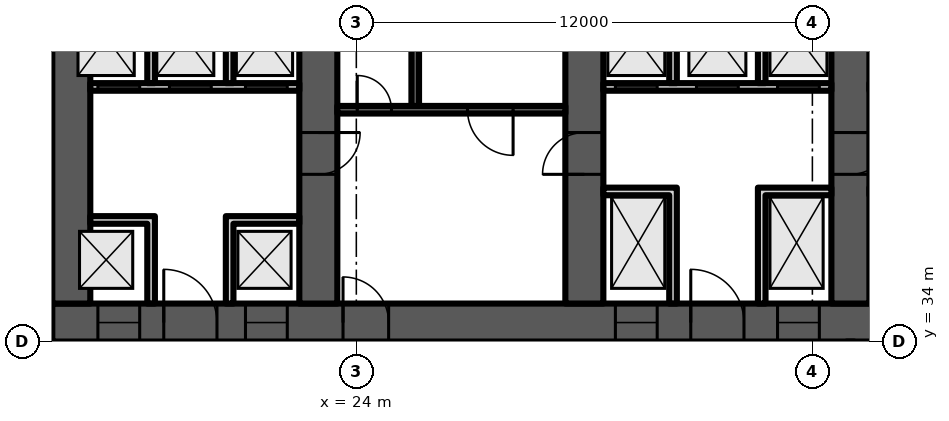
"""IFC4 building model, lengths in metres.
Left out: names, types, materials, properties, quantities, classifications, styles, units other than length and angle.
Written with IfcOpenShell. Run it as: python <this file> out.ifc"""

import sys

from ifc_helpers import new_model, si_unit, direction, frame, frame_2d, origin, place, context, subcontext, project, spatial, polyline, rectangle, outline, extrude, element, fill, save


model = new_model("IFC4")
c1 = context("Model", 3, precision=1e-05, world=origin(), true_north=direction((0.0, 1.0)))
c2 = subcontext(c1, "Body", "Model", "MODEL_VIEW")
j1 = project(units=[si_unit("LENGTHUNIT", "METRE"), si_unit("PLANEANGLEUNIT", "RADIAN")], contexts=[c1])
p1 = place(None, origin())
s1 = spatial("IfcSite", under=j1, at=p1, CompositionType="ELEMENT")
p2 = place(p1, origin())
s2 = spatial("IfcBuilding", under=s1, at=p2, CompositionType="ELEMENT")
p3 = place(p2, frame((0.0, 0.0, 147.1)))
s3 = spatial("IfcBuildingStorey", under=s2, at=p3, CompositionType="ELEMENT", Elevation=147.1)
p4 = place(p3, frame((16.0, 34.5, 0.0), z_axis=(0.0, 0.0, 1.0), x_axis=(1.0, 0.0, 0.0)))
e1 = element("IfcWall", 1, at=p4, inside=s3, PredefinedType="SHEAR", context=c2, shape_type="SweptSolid", body=[
    extrude(rectangle(XDim=49.0, YDim=1.0, at=frame_2d((24.5, 0.0))), origin(), (0.0, 0.0, 1.0), 4.8),
])
p5 = place(p4, frame((1.2, 0.0, 0.0)))
e2 = element("IfcOpeningElement", 2, at=p5, cuts=e1, PredefinedType="OPENING", context=c2, shape_type="SweptSolid", body=[
    extrude(rectangle(XDim=1.1, YDim=2.1, at=frame_2d((0.55, 1.05))), frame((0.0, 0.51, 0.0), z_axis=(0.0, -1.0, 0.0), x_axis=(1.0, 0.0, 0.0)), (0.0, 0.0, 1.0), 1.02),
])
p6 = place(p4, frame((5.083, 0.0, 0.0)))
e3 = element("IfcOpeningElement", 3, at=p6, cuts=e1, PredefinedType="OPENING", context=c2, shape_type="SweptSolid", body=[
    extrude(rectangle(XDim=1.1, YDim=2.1, at=frame_2d((0.55, 1.05))), frame((0.0, 0.51, 0.0), z_axis=(0.0, -1.0, 0.0), x_axis=(1.0, 0.0, 0.0)), (0.0, 0.0, 1.0), 1.02),
])
p7 = place(p4, frame((2.933, 0.0, 0.0)))
e4 = element("IfcOpeningElement", 4, at=p7, cuts=e1, PredefinedType="OPENING", context=c2, shape_type="SweptSolid", body=[
    extrude(rectangle(XDim=1.4, YDim=2.1, at=frame_2d((0.7, 1.05))), frame((0.0, 0.51, 0.0), z_axis=(0.0, -1.0, 0.0), x_axis=(1.0, 0.0, 0.0)), (0.0, 0.0, 1.0), 1.02),
])
p8 = place(p4, frame((7.65, 0.0, 0.0)))
e5 = element("IfcOpeningElement", 5, at=p8, cuts=e1, PredefinedType="OPENING", context=c2, shape_type="SweptSolid", body=[
    extrude(rectangle(XDim=1.2, YDim=2.1, at=frame_2d((0.6, 1.05))), frame((0.0, 0.51, 0.0), z_axis=(0.0, -1.0, 0.0), x_axis=(1.0, 0.0, 0.0)), (0.0, 0.0, 1.0), 1.02),
])
p9 = place(p4, frame((14.817, 0.0, 0.0)))
e6 = element("IfcOpeningElement", 6, at=p9, cuts=e1, PredefinedType="OPENING", context=c2, shape_type="SweptSolid", body=[
    extrude(rectangle(XDim=1.1, YDim=2.1, at=frame_2d((0.55, 1.05))), frame((0.0, 0.51, 0.0), z_axis=(0.0, -1.0, 0.0), x_axis=(1.0, 0.0, 0.0)), (0.0, 0.0, 1.0), 1.02),
])
p10 = place(p4, frame((19.083, 0.0, 0.0)))
e7 = element("IfcOpeningElement", 7, at=p10, cuts=e1, PredefinedType="OPENING", context=c2, shape_type="SweptSolid", body=[
    extrude(rectangle(XDim=1.1, YDim=2.1, at=frame_2d((0.55, 1.05))), frame((0.0, 0.51, 0.0), z_axis=(0.0, -1.0, 0.0), x_axis=(1.0, 0.0, 0.0)), (0.0, 0.0, 1.0), 1.02),
])
p11 = place(p4, frame((16.8, 0.0, 0.0)))
e8 = element("IfcOpeningElement", 8, at=p11, cuts=e1, PredefinedType="OPENING", context=c2, shape_type="SweptSolid", body=[
    extrude(rectangle(XDim=1.4, YDim=2.1, at=frame_2d((0.7, 1.05))), frame((0.0, 0.51, 0.0), z_axis=(0.0, -1.0, 0.0), x_axis=(1.0, 0.0, 0.0)), (0.0, 0.0, 1.0), 1.02),
])
p12 = place(p4, frame((21.817, 0.0, 0.0)))
e9 = element("IfcOpeningElement", 9, at=p12, cuts=e1, PredefinedType="OPENING", context=c2, shape_type="SweptSolid", body=[
    extrude(rectangle(XDim=1.1, YDim=2.1, at=frame_2d((0.55, 1.05))), frame((0.0, 0.51, 0.0), z_axis=(0.0, -1.0, 0.0), x_axis=(1.0, 0.0, 0.0)), (0.0, 0.0, 1.0), 1.02),
])
p13 = place(p4, frame((23.95, 0.0, 0.0)))
e10 = element("IfcOpeningElement", 10, at=p13, cuts=e1, PredefinedType="OPENING", context=c2, shape_type="SweptSolid", body=[
    extrude(rectangle(XDim=1.1, YDim=2.1, at=frame_2d((0.55, 1.05))), frame((0.0, 0.51, 0.0), z_axis=(0.0, -1.0, 0.0), x_axis=(1.0, 0.0, 0.0)), (0.0, 0.0, 1.0), 1.02),
])
p14 = place(p4, frame((26.083, 0.0, 0.0)))
e11 = element("IfcOpeningElement", 11, at=p14, cuts=e1, PredefinedType="OPENING", context=c2, shape_type="SweptSolid", body=[
    extrude(rectangle(XDim=1.1, YDim=2.1, at=frame_2d((0.55, 1.05))), frame((0.0, 0.51, 0.0), z_axis=(0.0, -1.0, 0.0), x_axis=(1.0, 0.0, 0.0)), (0.0, 0.0, 1.0), 1.02),
])
p15 = place(p4, frame((33.15, 0.0, 0.0)))
e12 = element("IfcOpeningElement", 12, at=p15, cuts=e1, PredefinedType="OPENING", context=c2, shape_type="SweptSolid", body=[
    extrude(rectangle(XDim=1.2, YDim=2.1, at=frame_2d((0.6, 1.05))), frame((0.0, 0.51, 0.0), z_axis=(0.0, -1.0, 0.0), x_axis=(1.0, 0.0, 0.0)), (0.0, 0.0, 1.0), 1.02),
])
p16 = place(p4, frame((35.817, 0.0, 0.0)))
e13 = element("IfcOpeningElement", 13, at=p16, cuts=e1, PredefinedType="OPENING", context=c2, shape_type="SweptSolid", body=[
    extrude(rectangle(XDim=1.1, YDim=2.1, at=frame_2d((0.55, 1.05))), frame((0.0, 0.51, 0.0), z_axis=(0.0, -1.0, 0.0), x_axis=(1.0, 0.0, 0.0)), (0.0, 0.0, 1.0), 1.02),
])
p17 = place(p4, frame((40.083, 0.0, 0.0)))
e14 = element("IfcOpeningElement", 14, at=p17, cuts=e1, PredefinedType="OPENING", context=c2, shape_type="SweptSolid", body=[
    extrude(rectangle(XDim=1.1, YDim=2.1, at=frame_2d((0.55, 1.05))), frame((0.0, 0.51, 0.0), z_axis=(0.0, -1.0, 0.0), x_axis=(1.0, 0.0, 0.0)), (0.0, 0.0, 1.0), 1.02),
])
p18 = place(p4, frame((37.8, 0.0, 0.0)))
e15 = element("IfcOpeningElement", 15, at=p18, cuts=e1, PredefinedType="OPENING", context=c2, shape_type="SweptSolid", body=[
    extrude(rectangle(XDim=1.4, YDim=2.1, at=frame_2d((0.7, 1.05))), frame((0.0, 0.51, 0.0), z_axis=(0.0, -1.0, 0.0), x_axis=(1.0, 0.0, 0.0)), (0.0, 0.0, 1.0), 1.02),
])
p19 = place(p4, frame((42.817, 0.0, 0.0)))
e16 = element("IfcOpeningElement", 16, at=p19, cuts=e1, PredefinedType="OPENING", context=c2, shape_type="SweptSolid", body=[
    extrude(rectangle(XDim=1.1, YDim=2.1, at=frame_2d((0.55, 1.05))), frame((0.0, 0.51, 0.0), z_axis=(0.0, -1.0, 0.0), x_axis=(1.0, 0.0, 0.0)), (0.0, 0.0, 1.0), 1.02),
])
p20 = place(p4, frame((46.7, 0.0, 0.0)))
e17 = element("IfcOpeningElement", 17, at=p20, cuts=e1, PredefinedType="OPENING", context=c2, shape_type="SweptSolid", body=[
    extrude(rectangle(XDim=1.1, YDim=2.1, at=frame_2d((0.55, 1.05))), frame((0.0, 0.51, 0.0), z_axis=(0.0, -1.0, 0.0), x_axis=(1.0, 0.0, 0.0)), (0.0, 0.0, 1.0), 1.02),
])
p21 = place(p4, frame((44.667, 0.0, 0.0)))
e18 = element("IfcOpeningElement", 18, at=p21, cuts=e1, PredefinedType="OPENING", context=c2, shape_type="SweptSolid", body=[
    extrude(rectangle(XDim=1.4, YDim=2.1, at=frame_2d((0.7, 1.05))), frame((0.0, 0.51, 0.0), z_axis=(0.0, -1.0, 0.0), x_axis=(1.0, 0.0, 0.0)), (0.0, 0.0, 1.0), 1.02),
])
p22 = place(p3, frame((16.5, 35.0, 0.0), z_axis=(0.0, 0.0, 1.0), x_axis=(0.0, 1.0, 0.0)))
e19 = element("IfcWall", 19, at=p22, inside=s3, PredefinedType="SHEAR", context=c2, shape_type="SweptSolid", body=[
    extrude(rectangle(XDim=12.784, YDim=1.0, at=frame_2d((6.392, 0.0))), origin(), (0.0, 0.0, 1.0), 4.8),
])
p23 = place(p3, frame((23.0, 35.0, 0.0), z_axis=(0.0, 0.0, 1.0), x_axis=(0.0, 1.0, 0.0)))
e20 = element("IfcWall", 20, at=p23, inside=s3, PredefinedType="SHEAR", context=c2, shape_type="SweptSolid", body=[
    extrude(rectangle(XDim=13.352, YDim=1.0, at=frame_2d((6.676, 0.0))), origin(), (0.0, 0.0, 1.0), 4.8),
])
p24 = place(p23, frame((10.426, 0.0, 0.0)))
e21 = element("IfcOpeningElement", 21, at=p24, cuts=e20, PredefinedType="OPENING", context=c2, shape_type="SweptSolid", body=[
    extrude(rectangle(XDim=1.0, YDim=2.1, at=frame_2d((0.5, 1.05))), frame((0.0, 0.51, 0.0), z_axis=(0.0, -1.0, 0.0), x_axis=(1.0, 0.0, 0.0)), (0.0, 0.0, 1.0), 1.02),
])
p25 = place(p23, frame((3.4, 0.0, 0.0)))
e22 = element("IfcOpeningElement", 22, at=p25, cuts=e20, PredefinedType="OPENING", context=c2, shape_type="SweptSolid", body=[
    extrude(rectangle(XDim=1.1, YDim=2.1, at=frame_2d((0.55, 1.05))), frame((0.0, 0.51, 0.0), z_axis=(0.0, -1.0, 0.0), x_axis=(1.0, 0.0, 0.0)), (0.0, 0.0, 1.0), 1.02),
])
p26 = place(p3, frame((30.0, 35.0, 0.0), z_axis=(0.0, 0.0, 1.0), x_axis=(0.0, 1.0, 0.0)))
e23 = element("IfcWall", 23, at=p26, inside=s3, PredefinedType="SHEAR", context=c2, shape_type="SweptSolid", body=[
    extrude(rectangle(XDim=13.965, YDim=1.0, at=frame_2d((6.982, 0.0))), origin(), (0.0, 0.0, 1.0), 4.8),
])
p27 = place(p26, frame((3.4, 0.0, 0.0)))
e24 = element("IfcOpeningElement", 24, at=p27, cuts=e23, PredefinedType="OPENING", context=c2, shape_type="SweptSolid", body=[
    extrude(rectangle(XDim=1.1, YDim=2.1, at=frame_2d((0.55, 1.05))), frame((0.0, 0.51, 0.0), z_axis=(0.0, -1.0, 0.0), x_axis=(1.0, 0.0, 0.0)), (0.0, 0.0, 1.0), 1.02),
])
p28 = place(p3, frame((37.0, 35.0, 0.0), z_axis=(0.0, 0.0, 1.0), x_axis=(0.0, 1.0, 0.0)))
e25 = element("IfcWall", 25, at=p28, inside=s3, PredefinedType="SHEAR", context=c2, shape_type="SweptSolid", body=[
    extrude(rectangle(XDim=14.577, YDim=1.0, at=frame_2d((7.289, 0.0))), origin(), (0.0, 0.0, 1.0), 4.8),
])
p29 = place(p28, frame((11.016, 0.0, 0.0)))
e26 = element("IfcOpeningElement", 26, at=p29, cuts=e25, PredefinedType="OPENING", context=c2, shape_type="SweptSolid", body=[
    extrude(rectangle(XDim=1.0, YDim=2.1, at=frame_2d((0.5, 1.05))), frame((0.0, 0.51, 0.0), z_axis=(0.0, -1.0, 0.0), x_axis=(1.0, 0.0, 0.0)), (0.0, 0.0, 1.0), 1.02),
])
p30 = place(p28, frame((3.4, 0.0, 0.0)))
e27 = element("IfcOpeningElement", 27, at=p30, cuts=e25, PredefinedType="OPENING", context=c2, shape_type="SweptSolid", body=[
    extrude(rectangle(XDim=1.1, YDim=2.1, at=frame_2d((0.55, 1.05))), frame((0.0, 0.51, 0.0), z_axis=(0.0, -1.0, 0.0), x_axis=(1.0, 0.0, 0.0)), (0.0, 0.0, 1.0), 1.02),
])
p31 = place(p3, frame((17.0, 40.7, 0.0), z_axis=(0.0, 0.0, 1.0), x_axis=(1.0, 0.0, 0.0)))
e28 = element("IfcWall", 28, at=p31, inside=s3, PredefinedType="PARTITIONING", context=c2, shape_type="SweptSolid", body=[
    extrude(rectangle(XDim=5.5, YDim=0.2, at=frame_2d((2.75, 0.0))), origin(), (0.0, 0.0, 1.0), 4.4),
])
p32 = place(p31, frame((0.2, 0.0, 0.0)))
e29 = element("IfcOpeningElement", 29, at=p32, cuts=e28, PredefinedType="OPENING", context=c2, shape_type="SweptSolid", body=[
    extrude(rectangle(XDim=1.1, YDim=2.1, at=frame_2d((0.55, 1.05))), frame((0.0, 0.11, 0.0), z_axis=(0.0, -1.0, 0.0), x_axis=(1.0, 0.0, 0.0)), (0.0, 0.0, 1.0), 0.22),
])
p33 = place(p31, frame((2.083, 0.0, 0.0)))
e30 = element("IfcOpeningElement", 30, at=p33, cuts=e28, PredefinedType="OPENING", context=c2, shape_type="SweptSolid", body=[
    extrude(rectangle(XDim=1.1, YDim=2.1, at=frame_2d((0.55, 1.05))), frame((0.0, 0.11, 0.0), z_axis=(0.0, -1.0, 0.0), x_axis=(1.0, 0.0, 0.0)), (0.0, 0.0, 1.0), 0.22),
])
p34 = place(p31, frame((4.083, 0.0, 0.0)))
e31 = element("IfcOpeningElement", 31, at=p34, cuts=e28, PredefinedType="OPENING", context=c2, shape_type="SweptSolid", body=[
    extrude(rectangle(XDim=1.1, YDim=2.1, at=frame_2d((0.55, 1.05))), frame((0.0, 0.11, 0.0), z_axis=(0.0, -1.0, 0.0), x_axis=(1.0, 0.0, 0.0)), (0.0, 0.0, 1.0), 0.22),
])
p35 = place(p3, frame((0.0, 0.0, -0.0)))
e32 = element("IfcWall", 32, at=p35, inside=s3, PredefinedType="PARTITIONING", context=c2, shape_type="SweptSolid", body=[
    extrude(outline(polyline([(18.5, 37.1), (17.0, 37.1), (17.0, 37.3), (18.5, 37.3), (18.7, 37.3), (18.7, 35.0), (18.5, 35.0), (18.5, 37.1)])), origin(), (0.0, 0.0, 1.0), 4.4),
])
p36 = place(p3, frame((0.0, 0.0, -0.0)))
e33 = element("IfcWall", 33, at=p36, inside=s3, PredefinedType="PARTITIONING", context=c2, shape_type="SweptSolid", body=[
    extrude(outline(polyline([(20.567, 37.3), (20.767, 37.3), (22.5, 37.3), (22.5, 37.1), (20.767, 37.1), (20.767, 35.0), (20.567, 35.0), (20.567, 37.3)])), origin(), (0.0, 0.0, 1.0), 4.4),
])
p37 = place(p3, frame((0.0, 0.0, -0.0)))
e34 = element("IfcWall", 34, at=p37, inside=s3, PredefinedType="PARTITIONING", context=c2, shape_type="SweptSolid", body=[
    extrude(outline(polyline([(18.7, 40.8), (18.5, 40.8), (18.5, 43.8), (17.0, 43.8), (17.0, 44.0), (22.5, 44.0), (22.5, 43.8), (20.767, 43.8), (20.767, 40.8), (20.567, 40.8), (20.567, 43.8), (18.7, 43.8), (18.7, 40.8)])), origin(), (0.0, 0.0, 1.0), 4.4),
])
p38 = place(p3, frame((23.5, 40.1, 0.0), z_axis=(0.0, 0.0, 1.0), x_axis=(1.0, 0.0, 0.0)))
e35 = element("IfcWall", 35, at=p38, inside=s3, PredefinedType="SHEAR", context=c2, shape_type="SweptSolid", body=[
    extrude(rectangle(XDim=6.0, YDim=0.2, at=frame_2d((3.0, 0.0))), origin(), (0.0, 0.0, 1.0), 4.4),
])
p39 = place(p38, frame((3.425, 0.0, 0.0)))
e36 = element("IfcOpeningElement", 36, at=p39, cuts=e35, PredefinedType="OPENING", context=c2, shape_type="SweptSolid", body=[
    extrude(rectangle(XDim=1.2, YDim=2.1, at=frame_2d((0.6, 1.05))), frame((0.0, 0.11, 0.0), z_axis=(0.0, -1.0, 0.0), x_axis=(1.0, 0.0, 0.0)), (0.0, 0.0, 1.0), 0.22),
])
p40 = place(p38, frame((0.525, 0.0, 0.0)))
e37 = element("IfcOpeningElement", 37, at=p40, cuts=e35, PredefinedType="OPENING", context=c2, shape_type="SweptSolid", body=[
    extrude(rectangle(XDim=0.9, YDim=2.1, at=frame_2d((0.45, 1.05))), frame((0.0, 0.11, 0.0), z_axis=(0.0, -1.0, 0.0), x_axis=(1.0, 0.0, 0.0)), (0.0, 0.0, 1.0), 0.22),
])
p41 = place(p3, frame((25.55, 40.2, 0.0), z_axis=(0.0, 0.0, 1.0), x_axis=(0.0, 1.0, 0.0)))
e38 = element("IfcWall", 38, at=p41, inside=s3, PredefinedType="SHEAR", context=c2, shape_type="SweptSolid", body=[
    extrude(rectangle(XDim=7.2, YDim=0.2, at=frame_2d((3.6, 0.0))), origin(), (0.0, 0.0, 1.0), 4.4),
])
p42 = place(p3, frame((30.5, 40.7, 0.0), z_axis=(0.0, 0.0, 1.0), x_axis=(1.0, 0.0, 0.0)))
e39 = element("IfcWall", 39, at=p42, inside=s3, PredefinedType="PARTITIONING", context=c2, shape_type="SweptSolid", body=[
    extrude(rectangle(XDim=6.0, YDim=0.2, at=frame_2d((3.0, 0.0))), origin(), (0.0, 0.0, 1.0), 4.4),
])
p43 = place(p42, frame((0.317, 0.0, 0.0)))
e40 = element("IfcOpeningElement", 40, at=p43, cuts=e39, PredefinedType="OPENING", context=c2, shape_type="SweptSolid", body=[
    extrude(rectangle(XDim=1.1, YDim=2.1, at=frame_2d((0.55, 1.05))), frame((0.0, 0.11, 0.0), z_axis=(0.0, -1.0, 0.0), x_axis=(1.0, 0.0, 0.0)), (0.0, 0.0, 1.0), 0.22),
])
p44 = place(p42, frame((2.45, 0.0, 0.0)))
e41 = element("IfcOpeningElement", 41, at=p44, cuts=e39, PredefinedType="OPENING", context=c2, shape_type="SweptSolid", body=[
    extrude(rectangle(XDim=1.1, YDim=2.1, at=frame_2d((0.55, 1.05))), frame((0.0, 0.11, 0.0), z_axis=(0.0, -1.0, 0.0), x_axis=(1.0, 0.0, 0.0)), (0.0, 0.0, 1.0), 0.22),
])
p45 = place(p42, frame((4.583, 0.0, 0.0)))
e42 = element("IfcOpeningElement", 42, at=p45, cuts=e39, PredefinedType="OPENING", context=c2, shape_type="SweptSolid", body=[
    extrude(rectangle(XDim=1.1, YDim=2.1, at=frame_2d((0.55, 1.05))), frame((0.0, 0.11, 0.0), z_axis=(0.0, -1.0, 0.0), x_axis=(1.0, 0.0, 0.0)), (0.0, 0.0, 1.0), 0.22),
])
p46 = place(p3, frame((0.0, 0.0, -0.0)))
e43 = element("IfcWall", 43, at=p46, inside=s3, PredefinedType="PARTITIONING", context=c2, shape_type="SweptSolid", body=[
    extrude(outline(polyline([(32.233, 37.85), (30.5, 37.85), (30.5, 38.05), (32.233, 38.05), (32.433, 38.05), (32.433, 35.0), (32.233, 35.0), (32.233, 37.85)])), origin(), (0.0, 0.0, 1.0), 4.4),
])
p47 = place(p3, frame((0.0, 0.0, -0.0)))
e44 = element("IfcWall", 44, at=p47, inside=s3, PredefinedType="PARTITIONING", context=c2, shape_type="SweptSolid", body=[
    extrude(outline(polyline([(34.567, 38.05), (34.767, 38.05), (36.5, 38.05), (36.5, 37.85), (34.767, 37.85), (34.767, 35.0), (34.567, 35.0), (34.567, 38.05)])), origin(), (0.0, 0.0, 1.0), 4.4),
])
p48 = place(p3, frame((0.0, 0.0, -0.0)))
e45 = element("IfcWall", 45, at=p48, inside=s3, PredefinedType="PARTITIONING", context=c2, shape_type="SweptSolid", body=[
    extrude(outline(polyline([(32.433, 40.8), (32.233, 40.8), (32.233, 43.8), (30.5, 43.8), (30.5, 44.0), (36.5, 44.0), (36.5, 43.8), (34.767, 43.8), (34.767, 40.8), (34.567, 40.8), (34.567, 43.8), (32.433, 43.8), (32.433, 40.8)])), origin(), (0.0, 0.0, 1.0), 4.4),
])
p49 = place(p5, origin())
e46 = element("IfcDoor", 46, at=p49, inside=s3, OperationType="DOUBLE_DOOR_SLIDING", PredefinedType="DOOR", context=c2, shape_type="SweptSolid", body=[
    extrude(rectangle(XDim=1.1, YDim=2.1, at=frame_2d((0.55, 1.05))), frame((0.0, 0.025, 0.0), z_axis=(0.0, -1.0, 0.0), x_axis=(1.0, 0.0, 0.0)), (0.0, 0.0, 1.0), 0.05),
])
fill(e2, e46)
p50 = place(p6, origin())
e47 = element("IfcDoor", 47, at=p50, inside=s3, OperationType="DOUBLE_DOOR_SLIDING", PredefinedType="DOOR", context=c2, shape_type="SweptSolid", body=[
    extrude(rectangle(XDim=1.1, YDim=2.1, at=frame_2d((0.55, 1.05))), frame((0.0, 0.025, 0.0), z_axis=(0.0, -1.0, 0.0), x_axis=(1.0, 0.0, 0.0)), (0.0, 0.0, 1.0), 0.05),
])
fill(e3, e47)
p51 = place(p7, origin())
e48 = element("IfcDoor", 48, at=p51, inside=s3, OperationType="DOUBLE_DOOR_SINGLE_SWING", PredefinedType="DOOR", context=c2, shape_type="SweptSolid", body=[
    extrude(rectangle(XDim=1.4, YDim=2.1, at=frame_2d((0.7, 1.05))), frame((0.0, 0.025, 0.0), z_axis=(0.0, -1.0, 0.0), x_axis=(1.0, 0.0, 0.0)), (0.0, 0.0, 1.0), 0.05),
])
fill(e4, e48)
p52 = place(p32, origin())
e49 = element("IfcDoor", 49, at=p52, inside=s3, OperationType="DOUBLE_DOOR_SLIDING", PredefinedType="DOOR", context=c2, shape_type="SweptSolid", body=[
    extrude(rectangle(XDim=1.1, YDim=2.1, at=frame_2d((0.55, 1.05))), frame((0.0, 0.025, 0.0), z_axis=(0.0, -1.0, 0.0), x_axis=(1.0, 0.0, 0.0)), (0.0, 0.0, 1.0), 0.05),
])
fill(e29, e49)
p53 = place(p33, origin())
e50 = element("IfcDoor", 50, at=p53, inside=s3, OperationType="DOUBLE_DOOR_SLIDING", PredefinedType="DOOR", context=c2, shape_type="SweptSolid", body=[
    extrude(rectangle(XDim=1.1, YDim=2.1, at=frame_2d((0.55, 1.05))), frame((0.0, 0.025, 0.0), z_axis=(0.0, -1.0, 0.0), x_axis=(1.0, 0.0, 0.0)), (0.0, 0.0, 1.0), 0.05),
])
fill(e30, e50)
p54 = place(p34, origin())
e51 = element("IfcDoor", 51, at=p54, inside=s3, OperationType="DOUBLE_DOOR_SLIDING", PredefinedType="DOOR", context=c2, shape_type="SweptSolid", body=[
    extrude(rectangle(XDim=1.1, YDim=2.1, at=frame_2d((0.55, 1.05))), frame((0.0, 0.025, 0.0), z_axis=(0.0, -1.0, 0.0), x_axis=(1.0, 0.0, 0.0)), (0.0, 0.0, 1.0), 0.05),
])
fill(e31, e51)
p55 = place(p39, origin())
e52 = element("IfcDoor", 52, at=p55, inside=s3, OperationType="SINGLE_SWING_RIGHT", PredefinedType="DOOR", context=c2, shape_type="SweptSolid", body=[
    extrude(rectangle(XDim=1.2, YDim=2.1, at=frame_2d((0.6, 1.05))), frame((0.0, 0.025, 0.0), z_axis=(0.0, -1.0, 0.0), x_axis=(1.0, 0.0, 0.0)), (0.0, 0.0, 1.0), 0.05),
])
fill(e36, e52)
p56 = place(p40, origin())
e53 = element("IfcDoor", 53, at=p56, inside=s3, OperationType="SINGLE_SWING_LEFT", PredefinedType="DOOR", context=c2, shape_type="SweptSolid", body=[
    extrude(rectangle(XDim=0.9, YDim=2.1, at=frame_2d((0.45, 1.05))), frame((0.0, 0.025, 0.0), z_axis=(0.0, -1.0, 0.0), x_axis=(1.0, 0.0, 0.0)), (0.0, 0.0, 1.0), 0.05),
])
fill(e37, e53)
p57 = place(p8, origin())
e54 = element("IfcDoor", 54, at=p57, inside=s3, OperationType="SINGLE_SWING_LEFT", PredefinedType="DOOR", context=c2, shape_type="SweptSolid", body=[
    extrude(rectangle(XDim=1.2, YDim=2.1, at=frame_2d((0.6, 1.05))), frame((0.0, 0.025, 0.0), z_axis=(0.0, -1.0, 0.0), x_axis=(1.0, 0.0, 0.0)), (0.0, 0.0, 1.0), 0.05),
])
fill(e5, e54)
p58 = place(p9, origin())
e55 = element("IfcDoor", 55, at=p58, inside=s3, OperationType="DOUBLE_DOOR_SLIDING", PredefinedType="DOOR", context=c2, shape_type="SweptSolid", body=[
    extrude(rectangle(XDim=1.1, YDim=2.1, at=frame_2d((0.55, 1.05))), frame((0.0, 0.025, 0.0), z_axis=(0.0, -1.0, 0.0), x_axis=(1.0, 0.0, 0.0)), (0.0, 0.0, 1.0), 0.05),
])
fill(e6, e55)
p59 = place(p10, origin())
e56 = element("IfcDoor", 56, at=p59, inside=s3, OperationType="DOUBLE_DOOR_SLIDING", PredefinedType="DOOR", context=c2, shape_type="SweptSolid", body=[
    extrude(rectangle(XDim=1.1, YDim=2.1, at=frame_2d((0.55, 1.05))), frame((0.0, 0.025, 0.0), z_axis=(0.0, -1.0, 0.0), x_axis=(1.0, 0.0, 0.0)), (0.0, 0.0, 1.0), 0.05),
])
fill(e7, e56)
p60 = place(p11, origin())
e57 = element("IfcDoor", 57, at=p60, inside=s3, OperationType="DOUBLE_DOOR_SINGLE_SWING", PredefinedType="DOOR", context=c2, shape_type="SweptSolid", body=[
    extrude(rectangle(XDim=1.4, YDim=2.1, at=frame_2d((0.7, 1.05))), frame((0.0, 0.025, 0.0), z_axis=(0.0, -1.0, 0.0), x_axis=(1.0, 0.0, 0.0)), (0.0, 0.0, 1.0), 0.05),
])
fill(e8, e57)
p61 = place(p43, origin())
e58 = element("IfcDoor", 58, at=p61, inside=s3, OperationType="DOUBLE_DOOR_SLIDING", PredefinedType="DOOR", context=c2, shape_type="SweptSolid", body=[
    extrude(rectangle(XDim=1.1, YDim=2.1, at=frame_2d((0.55, 1.05))), frame((0.0, 0.025, 0.0), z_axis=(0.0, -1.0, 0.0), x_axis=(1.0, 0.0, 0.0)), (0.0, 0.0, 1.0), 0.05),
])
fill(e40, e58)
p62 = place(p44, origin())
e59 = element("IfcDoor", 59, at=p62, inside=s3, OperationType="DOUBLE_DOOR_SLIDING", PredefinedType="DOOR", context=c2, shape_type="SweptSolid", body=[
    extrude(rectangle(XDim=1.1, YDim=2.1, at=frame_2d((0.55, 1.05))), frame((0.0, 0.025, 0.0), z_axis=(0.0, -1.0, 0.0), x_axis=(1.0, 0.0, 0.0)), (0.0, 0.0, 1.0), 0.05),
])
fill(e41, e59)
p63 = place(p45, origin())
e60 = element("IfcDoor", 60, at=p63, inside=s3, OperationType="DOUBLE_DOOR_SLIDING", PredefinedType="DOOR", context=c2, shape_type="SweptSolid", body=[
    extrude(rectangle(XDim=1.1, YDim=2.1, at=frame_2d((0.55, 1.05))), frame((0.0, 0.025, 0.0), z_axis=(0.0, -1.0, 0.0), x_axis=(1.0, 0.0, 0.0)), (0.0, 0.0, 1.0), 0.05),
])
fill(e42, e60)
p64 = place(p25, origin())
e61 = element("IfcDoor", 61, at=p64, inside=s3, OperationType="SINGLE_SWING_RIGHT", PredefinedType="DOOR", context=c2, shape_type="SweptSolid", body=[
    extrude(rectangle(XDim=1.1, YDim=2.1, at=frame_2d((0.55, 1.05))), frame((0.0, 0.025, 0.0), z_axis=(0.0, -1.0, 0.0), x_axis=(1.0, 0.0, 0.0)), (0.0, 0.0, 1.0), 0.05),
])
fill(e22, e61)
p65 = place(p27, origin())
e62 = element("IfcDoor", 62, at=p65, inside=s3, OperationType="SINGLE_SWING_LEFT", PredefinedType="DOOR", context=c2, shape_type="SweptSolid", body=[
    extrude(rectangle(XDim=1.1, YDim=2.1, at=frame_2d((0.55, 1.05))), frame((0.0, 0.025, 0.0), z_axis=(0.0, -1.0, 0.0), x_axis=(1.0, 0.0, 0.0)), (0.0, 0.0, 1.0), 0.05),
])
fill(e24, e62)
p66 = place(p30, origin())
e63 = element("IfcDoor", 63, at=p66, inside=s3, OperationType="SINGLE_SWING_RIGHT", PredefinedType="DOOR", context=c2, shape_type="SweptSolid", body=[
    extrude(rectangle(XDim=1.1, YDim=2.1, at=frame_2d((0.55, 1.05))), frame((0.0, 0.025, 0.0), z_axis=(0.0, -1.0, 0.0), x_axis=(1.0, 0.0, 0.0)), (0.0, 0.0, 1.0), 0.05),
])
fill(e27, e63)
save(model, sys.argv[1])
